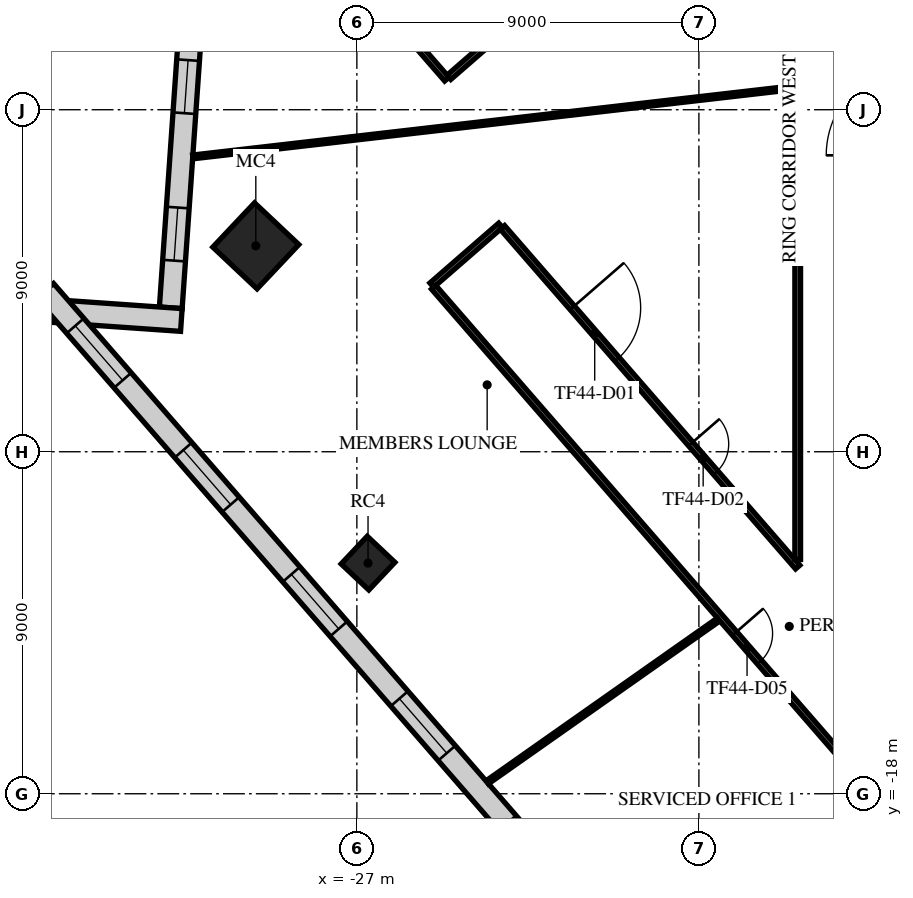
"""IFC4 building model, lengths in metres.
Left out: names, types, materials, properties, quantities, classifications, styles, units other than length and angle.
Written with IfcOpenShell. Run it as: python <this file> out.ifc"""

import sys

from ifc_helpers import new_model, si_unit, direction, frame, frame_2d, origin, origin_2d, place, context, subcontext, project, spatial, rectangle, extrude, element, fill, save


model = new_model("IFC4")
c1 = context("Model", 3, precision=1e-05, world=origin(), true_north=direction((0.0, 1.0)))
c2 = subcontext(c1, "Body", "Model", "MODEL_VIEW")
j1 = project(units=[si_unit("LENGTHUNIT", "METRE"), si_unit("PLANEANGLEUNIT", "RADIAN")], contexts=[c1])
p1 = place(None, origin())
s1 = spatial("IfcSite", under=j1, at=p1, CompositionType="ELEMENT")
p2 = place(p1, origin())
s2 = spatial("IfcBuilding", under=s1, at=p2, CompositionType="ELEMENT")
p3 = place(p2, frame((0.0, 0.0, 189.3)))
s3 = spatial("IfcBuildingStorey", under=s2, at=p3, CompositionType="ELEMENT", Elevation=189.3)
p4 = place(p3, frame((-29.659, -3.582, -0.38), z_axis=(0.0, 0.0, 1.0), x_axis=(0.685916152371, 0.727680583715, 0.0)))
e1 = element("IfcColumn", 1, at=p4, inside=s3, PredefinedType="COLUMN", context=c2, shape_type="SweptSolid", body=[
    extrude(rectangle(XDim=1.6, YDim=1.6, at=origin_2d()), origin(), (0.0, 0.0, 1.0), 4.38),
])
p5 = place(p3, frame((-26.706, -11.931, -0.38), z_axis=(0.0, 0.0, 1.0), x_axis=(0.685916152371, 0.727680583715, 0.0)))
e2 = element("IfcColumn", 2, at=p5, inside=s3, PredefinedType="COLUMN", context=c2, shape_type="SweptSolid", body=[
    extrude(rectangle(XDim=1.0, YDim=1.0, at=origin_2d()), origin(), (0.0, 0.0, 1.0), 4.38),
])
p6 = place(p3, frame((-31.354, 2.547, 0.0), z_axis=(0.0, 0.0, 1.0), x_axis=(-0.069743544409, -0.997564954283, 0.0)))
e3 = element("IfcWall", 3, at=p6, inside=s3, PredefinedType="STANDARD", context=c2, shape_type="SweptSolid", body=[
    extrude(rectangle(XDim=7.778, YDim=0.6, at=frame_2d((3.889, 0.0))), origin(), (0.0, 0.0, 1.0), 3.62),
])
p7 = place(p6, frame((1.244, 0.0, 0.9)))
e4 = element("IfcOpeningElement", 4, at=p7, cuts=e3, PredefinedType="OPENING", context=c2, shape_type="SweptSolid", body=[
    extrude(rectangle(XDim=1.4, YDim=2.1, at=frame_2d((0.7, 1.05))), frame((0.0, 0.31, 0.0), z_axis=(0.0, -1.0, 0.0), x_axis=(1.0, 0.0, 0.0)), (0.0, 0.0, 1.0), 0.62),
])
p8 = place(p6, frame((5.134, 0.0, 0.9)))
e5 = element("IfcOpeningElement", 5, at=p8, cuts=e3, PredefinedType="OPENING", context=c2, shape_type="SweptSolid", body=[
    extrude(rectangle(XDim=1.4, YDim=2.1, at=frame_2d((0.7, 1.05))), frame((0.0, 0.31, 0.0), z_axis=(0.0, -1.0, 0.0), x_axis=(1.0, 0.0, 0.0)), (0.0, 0.0, 1.0), 0.62),
])
p9 = place(p3, frame((-31.618, -5.532, 0.0), z_axis=(0.0, 0.0, 1.0), x_axis=(-0.997563916762, 0.069758382828, 0.0)))
e6 = element("IfcWall", 6, at=p9, inside=s3, PredefinedType="STANDARD", context=c2, shape_type="SweptSolid", body=[
    extrude(rectangle(XDim=3.846, YDim=0.6, at=frame_2d((1.923, 0.0))), origin(), (0.0, 0.0, 1.0), 3.62),
])
p10 = place(p3, frame((-35.208, -4.768, 0.0), z_axis=(0.0, 0.0, 1.0), x_axis=(0.656058749455, -0.754709823219, 0.0)))
e7 = element("IfcWall", 7, at=p10, inside=s3, PredefinedType="STANDARD", context=c2, shape_type="SweptSolid", body=[
    extrude(rectangle(XDim=39.0, YDim=0.6, at=frame_2d((19.5, 0.0))), origin(), (0.0, 0.0, 1.0), 3.62),
])
p11 = place(p10, frame((1.217, 0.0, 0.9)))
e8 = element("IfcOpeningElement", 8, at=p11, cuts=e7, PredefinedType="OPENING", context=c2, shape_type="SweptSolid", body=[
    extrude(rectangle(XDim=1.9, YDim=2.1, at=frame_2d((0.95, 1.05))), frame((0.0, 0.31, 0.0), z_axis=(0.0, -1.0, 0.0), x_axis=(1.0, 0.0, 0.0)), (0.0, 0.0, 1.0), 0.62),
])
p12 = place(p10, frame((5.55, 0.0, 0.9)))
e9 = element("IfcOpeningElement", 9, at=p12, cuts=e7, PredefinedType="OPENING", context=c2, shape_type="SweptSolid", body=[
    extrude(rectangle(XDim=1.9, YDim=2.1, at=frame_2d((0.95, 1.05))), frame((0.0, 0.31, 0.0), z_axis=(0.0, -1.0, 0.0), x_axis=(1.0, 0.0, 0.0)), (0.0, 0.0, 1.0), 0.62),
])
p13 = place(p10, frame((9.883, 0.0, 0.9)))
e10 = element("IfcOpeningElement", 10, at=p13, cuts=e7, PredefinedType="OPENING", context=c2, shape_type="SweptSolid", body=[
    extrude(rectangle(XDim=1.9, YDim=2.1, at=frame_2d((0.95, 1.05))), frame((0.0, 0.31, 0.0), z_axis=(0.0, -1.0, 0.0), x_axis=(1.0, 0.0, 0.0)), (0.0, 0.0, 1.0), 0.62),
])
p14 = place(p10, frame((14.217, 0.0, 0.9)))
e11 = element("IfcOpeningElement", 11, at=p14, cuts=e7, PredefinedType="OPENING", context=c2, shape_type="SweptSolid", body=[
    extrude(rectangle(XDim=1.9, YDim=2.1, at=frame_2d((0.95, 1.05))), frame((0.0, 0.31, 0.0), z_axis=(0.0, -1.0, 0.0), x_axis=(1.0, 0.0, 0.0)), (0.0, 0.0, 1.0), 0.62),
])
p15 = place(p10, frame((18.55, 0.0, 0.9)))
e12 = element("IfcOpeningElement", 12, at=p15, cuts=e7, PredefinedType="OPENING", context=c2, shape_type="SweptSolid", body=[
    extrude(rectangle(XDim=1.9, YDim=2.1, at=frame_2d((0.95, 1.05))), frame((0.0, 0.31, 0.0), z_axis=(0.0, -1.0, 0.0), x_axis=(1.0, 0.0, 0.0)), (0.0, 0.0, 1.0), 0.62),
])
p16 = place(p10, frame((22.883, 0.0, 0.9)))
e13 = element("IfcOpeningElement", 13, at=p16, cuts=e7, PredefinedType="OPENING", context=c2, shape_type="SweptSolid", body=[
    extrude(rectangle(XDim=1.9, YDim=2.1, at=frame_2d((0.95, 1.05))), frame((0.0, 0.31, 0.0), z_axis=(0.0, -1.0, 0.0), x_axis=(1.0, 0.0, 0.0)), (0.0, 0.0, 1.0), 0.62),
])
p17 = place(p10, frame((27.217, 0.0, 0.9)))
e14 = element("IfcOpeningElement", 14, at=p17, cuts=e7, PredefinedType="OPENING", context=c2, shape_type="SweptSolid", body=[
    extrude(rectangle(XDim=1.9, YDim=2.1, at=frame_2d((0.95, 1.05))), frame((0.0, 0.31, 0.0), z_axis=(0.0, -1.0, 0.0), x_axis=(1.0, 0.0, 0.0)), (0.0, 0.0, 1.0), 0.62),
])
p18 = place(p10, frame((31.55, 0.0, 0.9)))
e15 = element("IfcOpeningElement", 15, at=p18, cuts=e7, PredefinedType="OPENING", context=c2, shape_type="SweptSolid", body=[
    extrude(rectangle(XDim=1.9, YDim=2.1, at=frame_2d((0.95, 1.05))), frame((0.0, 0.31, 0.0), z_axis=(0.0, -1.0, 0.0), x_axis=(1.0, 0.0, 0.0)), (0.0, 0.0, 1.0), 0.62),
])
p19 = place(p10, frame((35.883, 0.0, 0.9)))
e16 = element("IfcOpeningElement", 16, at=p19, cuts=e7, PredefinedType="OPENING", context=c2, shape_type="SweptSolid", body=[
    extrude(rectangle(XDim=1.9, YDim=2.1, at=frame_2d((0.95, 1.05))), frame((0.0, 0.31, 0.0), z_axis=(0.0, -1.0, 0.0), x_axis=(1.0, 0.0, 0.0)), (0.0, 0.0, 1.0), 0.62),
])
p20 = place(p3, frame((-26.159, 2.559, 0.0), z_axis=(0.0, 0.0, 1.0), x_axis=(0.65619691316, -0.754589697226, 0.0)))
e17 = element("IfcWall", 17, at=p20, inside=s3, PredefinedType="PARTITIONING", context=c2, shape_type="SweptSolid", body=[
    extrude(rectangle(XDim=2.325, YDim=0.15, at=frame_2d((1.163, 0.0))), origin(), (0.0, 0.0, 1.0), 3.17),
])
p21 = place(p3, frame((-25.029, -4.616, 0.0), z_axis=(0.0, 0.0, 1.0), x_axis=(0.75457705231, 0.656211453822, 0.0)))
e18 = element("IfcWall", 18, at=p21, inside=s3, PredefinedType="PARTITIONING", context=c2, shape_type="SweptSolid", body=[
    extrude(rectangle(XDim=2.4, YDim=0.15, at=frame_2d((1.2, 0.0))), origin(), (0.0, 0.0, 1.0), 3.17),
])
p22 = place(p3, frame((-24.98, -4.673, 0.0), z_axis=(0.0, 0.0, 1.0), x_axis=(0.656048444225, -0.754718781289, 0.0)))
e19 = element("IfcWall", 19, at=p22, inside=s3, PredefinedType="PARTITIONING", context=c2, shape_type="SweptSolid", body=[
    extrude(rectangle(XDim=25.8, YDim=0.15, at=frame_2d((12.9, 0.0))), origin(), (0.0, 0.0, 1.0), 3.17),
])
p23 = place(p22, frame((12.071, 0.0, 0.0)))
e20 = element("IfcOpeningElement", 20, at=p23, cuts=e19, PredefinedType="OPENING", context=c2, shape_type="SweptSolid", body=[
    extrude(rectangle(XDim=1.0, YDim=2.1, at=frame_2d((0.5, 1.05))), frame((0.0, 0.085, 0.0), z_axis=(0.0, -1.0, 0.0), x_axis=(1.0, 0.0, 0.0)), (0.0, 0.0, 1.0), 0.17),
])
p24 = place(p22, frame((24.318, 0.0, 0.0)))
e21 = element("IfcOpeningElement", 21, at=p24, cuts=e19, PredefinedType="OPENING", context=c2, shape_type="SweptSolid", body=[
    extrude(rectangle(XDim=1.0, YDim=2.1, at=frame_2d((0.5, 1.05))), frame((0.0, 0.085, 0.0), z_axis=(0.0, -1.0, 0.0), x_axis=(1.0, 0.0, 0.0)), (0.0, 0.0, 1.0), 0.17),
])
p25 = place(p3, frame((-24.576, 0.854, 0.0), z_axis=(0.0, 0.0, 1.0), x_axis=(0.75472382762, 0.656042638875, 0.0)))
e22 = element("IfcWall", 22, at=p25, inside=s3, PredefinedType="PARTITIONING", context=c2, shape_type="SweptSolid", body=[
    extrude(rectangle(XDim=11.994, YDim=0.15, at=frame_2d((5.997, 0.0))), origin(), (0.0, 0.0, 1.0), 3.17),
])
p26 = place(p25, frame((6.8, 0.0, 0.0)))
e23 = element("IfcOpeningElement", 23, at=p26, cuts=e22, PredefinedType="OPENING", context=c2, shape_type="SweptSolid", body=[
    extrude(rectangle(XDim=1.8, YDim=2.1, at=frame_2d((0.9, 1.05))), frame((0.0, 0.085, 0.0), z_axis=(0.0, -1.0, 0.0), x_axis=(1.0, 0.0, 0.0)), (0.0, 0.0, 1.0), 0.17),
])
p27 = place(p3, frame((-23.169, -3.098, 0.0), z_axis=(0.0, 0.0, 1.0), x_axis=(0.656047525283, -0.754719580089, 0.0)))
e24 = element("IfcWall", 24, at=p27, inside=s3, PredefinedType="PARTITIONING", context=c2, shape_type="SweptSolid", body=[
    extrude(rectangle(XDim=11.842, YDim=0.15, at=frame_2d((5.921, 0.0))), origin(), (0.0, 0.0, 1.0), 3.17),
])
p28 = place(p27, frame((2.8, 0.0, 0.0)))
e25 = element("IfcOpeningElement", 25, at=p28, cuts=e24, PredefinedType="OPENING", context=c2, shape_type="SweptSolid", body=[
    extrude(rectangle(XDim=1.8, YDim=2.1, at=frame_2d((0.9, 1.05))), frame((0.0, 0.085, 0.0), z_axis=(0.0, -1.0, 0.0), x_axis=(1.0, 0.0, 0.0)), (0.0, 0.0, 1.0), 0.17),
])
p29 = place(p27, frame((7.55, 0.0, 0.0)))
e26 = element("IfcOpeningElement", 26, at=p29, cuts=e24, PredefinedType="OPENING", context=c2, shape_type="SweptSolid", body=[
    extrude(rectangle(XDim=1.0, YDim=2.1, at=frame_2d((0.5, 1.05))), frame((0.0, 0.085, 0.0), z_axis=(0.0, -1.0, 0.0), x_axis=(1.0, 0.0, 0.0)), (0.0, 0.0, 1.0), 0.17),
])
p30 = place(p3, frame((-15.4, -11.834, 0.0), z_axis=(0.0, 0.0, 1.0), x_axis=(0.0, 1.0, 0.0)))
e27 = element("IfcWall", 27, at=p30, inside=s3, PredefinedType="PARTITIONING", context=c2, shape_type="SweptSolid", body=[
    extrude(rectangle(XDim=20.666, YDim=0.15, at=frame_2d((10.333, 0.0))), origin(), (0.0, 0.0, 1.0), 3.17),
])
p31 = place(p3, frame((-31.316, -1.242, 0.0), z_axis=(0.0, 0.0, 1.0), x_axis=(0.993421473136, 0.114515399452, 0.0)))
e28 = element("IfcWall", 28, at=p31, inside=s3, PredefinedType="PARTITIONING", context=c2, shape_type="SweptSolid", body=[
    extrude(rectangle(XDim=15.941, YDim=0.1, at=frame_2d((7.97, 0.0))), origin(), (0.0, 0.0, 1.0), 3.17),
])
p32 = place(p3, frame((-23.568, -17.698, 0.0), z_axis=(0.0, 0.0, 1.0), x_axis=(0.817824726915, 0.575467389212, 0.0)))
e29 = element("IfcWall", 29, at=p32, inside=s3, PredefinedType="PARTITIONING", context=c2, shape_type="SweptSolid", body=[
    extrude(rectangle(XDim=7.438, YDim=0.1, at=frame_2d((3.719, 0.0))), origin(), (0.0, 0.0, 1.0), 3.17),
])
p33 = place(p7, origin())
e30 = element("IfcWindow", 30, at=p33, inside=s3, PartitioningType="SINGLE_PANEL", PredefinedType="WINDOW", context=c2, shape_type="SweptSolid", body=[
    extrude(rectangle(XDim=1.4, YDim=2.1, at=frame_2d((0.7, 1.05))), frame((0.0, 0.03, 0.0), z_axis=(0.0, -1.0, 0.0), x_axis=(1.0, 0.0, 0.0)), (0.0, 0.0, 1.0), 0.06),
])
fill(e4, e30)
p34 = place(p8, origin())
e31 = element("IfcWindow", 31, at=p34, inside=s3, PartitioningType="SINGLE_PANEL", PredefinedType="WINDOW", context=c2, shape_type="SweptSolid", body=[
    extrude(rectangle(XDim=1.4, YDim=2.1, at=frame_2d((0.7, 1.05))), frame((0.0, 0.03, 0.0), z_axis=(0.0, -1.0, 0.0), x_axis=(1.0, 0.0, 0.0)), (0.0, 0.0, 1.0), 0.06),
])
fill(e5, e31)
p35 = place(p11, origin())
e32 = element("IfcWindow", 32, at=p35, inside=s3, PartitioningType="SINGLE_PANEL", PredefinedType="WINDOW", context=c2, shape_type="SweptSolid", body=[
    extrude(rectangle(XDim=1.9, YDim=2.1, at=frame_2d((0.95, 1.05))), frame((0.0, 0.03, 0.0), z_axis=(0.0, -1.0, 0.0), x_axis=(1.0, 0.0, 0.0)), (0.0, 0.0, 1.0), 0.06),
])
fill(e8, e32)
p36 = place(p12, origin())
e33 = element("IfcWindow", 33, at=p36, inside=s3, PartitioningType="SINGLE_PANEL", PredefinedType="WINDOW", context=c2, shape_type="SweptSolid", body=[
    extrude(rectangle(XDim=1.9, YDim=2.1, at=frame_2d((0.95, 1.05))), frame((0.0, 0.03, 0.0), z_axis=(0.0, -1.0, 0.0), x_axis=(1.0, 0.0, 0.0)), (0.0, 0.0, 1.0), 0.06),
])
fill(e9, e33)
p37 = place(p13, origin())
e34 = element("IfcWindow", 34, at=p37, inside=s3, PartitioningType="SINGLE_PANEL", PredefinedType="WINDOW", context=c2, shape_type="SweptSolid", body=[
    extrude(rectangle(XDim=1.9, YDim=2.1, at=frame_2d((0.95, 1.05))), frame((0.0, 0.03, 0.0), z_axis=(0.0, -1.0, 0.0), x_axis=(1.0, 0.0, 0.0)), (0.0, 0.0, 1.0), 0.06),
])
fill(e10, e34)
p38 = place(p14, origin())
e35 = element("IfcWindow", 35, at=p38, inside=s3, PartitioningType="SINGLE_PANEL", PredefinedType="WINDOW", context=c2, shape_type="SweptSolid", body=[
    extrude(rectangle(XDim=1.9, YDim=2.1, at=frame_2d((0.95, 1.05))), frame((0.0, 0.03, 0.0), z_axis=(0.0, -1.0, 0.0), x_axis=(1.0, 0.0, 0.0)), (0.0, 0.0, 1.0), 0.06),
])
fill(e11, e35)
p39 = place(p28, origin())
e36 = element("IfcDoor", 36, at=p39, inside=s3, OperationType="DOUBLE_DOOR_SINGLE_SWING", PredefinedType="DOOR", context=c2, shape_type="SweptSolid", body=[
    extrude(rectangle(XDim=1.8, YDim=2.1, at=frame_2d((0.9, 1.05))), frame((0.0, 0.025, 0.0), z_axis=(0.0, -1.0, 0.0), x_axis=(1.0, 0.0, 0.0)), (0.0, 0.0, 1.0), 0.05),
])
fill(e25, e36)
p40 = place(p29, origin())
e37 = element("IfcDoor", 37, at=p40, inside=s3, OperationType="SINGLE_SWING_RIGHT", PredefinedType="DOOR", context=c2, shape_type="SweptSolid", body=[
    extrude(rectangle(XDim=1.0, YDim=2.1, at=frame_2d((0.5, 1.05))), frame((0.0, 0.025, 0.0), z_axis=(0.0, -1.0, 0.0), x_axis=(1.0, 0.0, 0.0)), (0.0, 0.0, 1.0), 0.05),
])
fill(e26, e37)
p41 = place(p23, frame((1.0, 0.0, 0.0), z_axis=(0.0, 0.0, 1.0), x_axis=(-1.0, 0.0, 0.0)))
e38 = element("IfcDoor", 38, at=p41, inside=s3, OperationType="SINGLE_SWING_LEFT", PredefinedType="DOOR", context=c2, shape_type="SweptSolid", body=[
    extrude(rectangle(XDim=1.0, YDim=2.1, at=frame_2d((0.5, 1.05))), frame((0.0, 0.025, 0.0), z_axis=(0.0, -1.0, 0.0), x_axis=(1.0, 0.0, 0.0)), (0.0, 0.0, 1.0), 0.05),
])
fill(e20, e38)
save(model, sys.argv[1])
